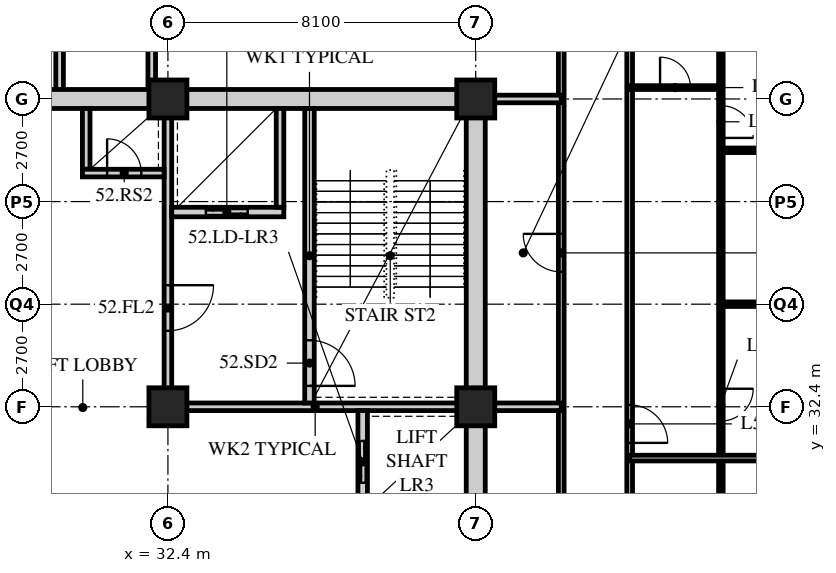
"""IFC4 building model, lengths in metres.
Left out: names, types, materials, properties, quantities, classifications, styles, units other than length and angle.
Written with IfcOpenShell. Run it as: python <this file> out.ifc"""

import sys

from ifc_helpers import new_model, si_unit, direction, frame, frame_2d, origin, origin_2d, place, context, subcontext, project, spatial, rectangle, hollow_rectangle, extrude, element, fill, save


model = new_model("IFC4")
c1 = context("Model", 3, precision=1e-05, world=origin(), true_north=direction((0.0, 1.0)))
c2 = subcontext(c1, "Body", "Model", "MODEL_VIEW")
j1 = project(units=[si_unit("LENGTHUNIT", "METRE"), si_unit("PLANEANGLEUNIT", "RADIAN")], contexts=[c1])
p1 = place(None, origin())
s1 = spatial("IfcSite", under=j1, at=p1, CompositionType="ELEMENT")
p2 = place(p1, origin())
s2 = spatial("IfcBuilding", under=s1, at=p2, CompositionType="ELEMENT")
p3 = place(p2, frame((0.0, 0.0, 202.8)))
s3 = spatial("IfcBuildingStorey", under=s2, at=p3, CompositionType="ELEMENT", Elevation=202.8)
for number, where, z_axis, x_axis in (
    (1, (32.4, 32.4, 0.0), (0.0, 0.0, 1.0), (1.0, 0.0, 0.0)),
    (2, (32.4, 40.5, 0.0), (0.0, 0.0, 1.0), (1.0, 0.0, 0.0)),
    (3, (40.5, 32.4, 0.0), (0.0, 0.0, 1.0), (1.0, 0.0, 0.0)),
    (4, (40.5, 40.5, 0.0), (0.0, 0.0, 1.0), (1.0, 0.0, 0.0)),
):
    element("IfcColumn", number, at=place(p3, frame(where, z_axis=z_axis, x_axis=x_axis)), inside=s3, PredefinedType="COLUMN", context=c2, shape_type="SweptSolid", body=[
        extrude(hollow_rectangle(XDim=1.0, YDim=1.0, WallThickness=0.1, at=origin_2d()), origin(), (0.0, 0.0, 1.0), 3.6),
    ])
p4 = place(p3, frame((44.55, 18.9, 0.0), z_axis=(0.0, 0.0, 1.0), x_axis=(0.0, 1.0, 0.0)))
e5 = element("IfcWall", 5, at=p4, inside=s3, PredefinedType="PARTITIONING", context=c2, shape_type="SweptSolid", body=[
    extrude(rectangle(XDim=28.35, YDim=0.15, at=frame_2d((14.175, 0.0))), origin(), (0.0, 0.0, 1.0), 3.39),
])
p5 = place(p4, frame((0.4, 0.0, 0.0)))
e6 = element("IfcOpeningElement", 6, at=p5, cuts=e5, PredefinedType="OPENING", context=c2, shape_type="SweptSolid", body=[
    extrude(rectangle(XDim=1.0, YDim=2.1, at=frame_2d((0.5, 1.05))), frame((0.0, 0.085, 0.0), z_axis=(0.0, -1.0, 0.0), x_axis=(1.0, 0.0, 0.0)), (0.0, 0.0, 1.0), 0.17),
])
p6 = place(p4, frame((12.55, 0.0, 0.0)))
e7 = element("IfcOpeningElement", 7, at=p6, cuts=e5, PredefinedType="OPENING", context=c2, shape_type="SweptSolid", body=[
    extrude(rectangle(XDim=1.0, YDim=2.1, at=frame_2d((0.5, 1.05))), frame((0.0, 0.085, 0.0), z_axis=(0.0, -1.0, 0.0), x_axis=(1.0, 0.0, 0.0)), (0.0, 0.0, 1.0), 0.17),
])
p7 = place(p4, frame((26.65, 0.0, 0.0)))
e8 = element("IfcOpeningElement", 8, at=p7, cuts=e5, PredefinedType="OPENING", context=c2, shape_type="SweptSolid", body=[
    extrude(rectangle(XDim=1.0, YDim=2.1, at=frame_2d((0.5, 1.05))), frame((0.0, 0.085, 0.0), z_axis=(0.0, -1.0, 0.0), x_axis=(1.0, 0.0, 0.0)), (0.0, 0.0, 1.0), 0.17),
])
p8 = place(p3, frame((42.75, 20.7, 0.0), z_axis=(0.0, 0.0, 1.0), x_axis=(0.0, 1.0, 0.0)))
e9 = element("IfcWall", 9, at=p8, inside=s3, PredefinedType="PARTITIONING", context=c2, shape_type="SweptSolid", body=[
    extrude(rectangle(XDim=24.75, YDim=0.15, at=frame_2d((12.375, 0.0))), origin(), (0.0, 0.0, 1.0), 3.39),
])
p9 = place(p8, frame((7.15, 0.0, 0.0)))
e10 = element("IfcOpeningElement", 10, at=p9, cuts=e9, PredefinedType="OPENING", context=c2, shape_type="SweptSolid", body=[
    extrude(rectangle(XDim=1.0, YDim=2.1, at=frame_2d((0.5, 1.05))), frame((0.0, 0.085, 0.0), z_axis=(0.0, -1.0, 0.0), x_axis=(1.0, 0.0, 0.0)), (0.0, 0.0, 1.0), 0.17),
])
p10 = place(p8, frame((15.25, 0.0, 0.0)))
e11 = element("IfcOpeningElement", 11, at=p10, cuts=e9, PredefinedType="OPENING", context=c2, shape_type="SweptSolid", body=[
    extrude(rectangle(XDim=1.0, YDim=2.1, at=frame_2d((0.5, 1.05))), frame((0.0, 0.085, 0.0), z_axis=(0.0, -1.0, 0.0), x_axis=(1.0, 0.0, 0.0)), (0.0, 0.0, 1.0), 0.17),
])
p11 = place(p3, frame((40.5, 32.4, 0.0), z_axis=(0.0, 0.0, 1.0), x_axis=(1.0, 0.0, 0.0)))
e12 = element("IfcWall", 12, at=p11, inside=s3, PredefinedType="SOLIDWALL", context=c2, shape_type="SweptSolid", body=[
    extrude(rectangle(XDim=2.25, YDim=0.2, at=frame_2d((1.125, 0.0))), origin(), (0.0, 0.0, 1.0), 3.39),
])
p12 = place(p3, frame((31.974, 45.45, 0.0), z_axis=(0.0, 0.0, 1.0), x_axis=(0.0, -1.0, 0.0)))
e13 = element("IfcWall", 13, at=p12, inside=s3, PredefinedType="SOLIDWALL", context=c2, shape_type="SweptSolid", body=[
    extrude(rectangle(XDim=4.95, YDim=0.2, at=frame_2d((2.475, 0.0))), origin(), (0.0, 0.0, 1.0), 2.69),
])
p13 = place(p3, frame((29.55, 40.5, 0.0), z_axis=(0.0, 0.0, 1.0), x_axis=(0.0, 1.0, 0.0)))
e14 = element("IfcWall", 14, at=p13, inside=s3, PredefinedType="SOLIDWALL", context=c2, shape_type="SweptSolid", body=[
    extrude(rectangle(XDim=4.95, YDim=0.2, at=frame_2d((2.475, 0.0))), origin(), (0.0, 0.0, 1.0), 3.39),
])
p14 = place(p3, frame((40.5, 40.5, 0.0), z_axis=(0.0, 0.0, 1.0), x_axis=(1.0, 0.0, 0.0)))
e15 = element("IfcWall", 15, at=p14, inside=s3, PredefinedType="SOLIDWALL", context=c2, shape_type="SweptSolid", body=[
    extrude(rectangle(XDim=2.25, YDim=0.2, at=frame_2d((1.125, 0.0))), origin(), (0.0, 0.0, 1.0), 3.39),
])
p15 = place(p3, frame((46.95, 18.9, 0.0), z_axis=(0.0, 0.0, 1.0), x_axis=(0.0, 1.0, 0.0)))
e16 = element("IfcWall", 16, at=p15, inside=s3, PredefinedType="PARTITIONING", context=c2, shape_type="SweptSolid", body=[
    extrude(rectangle(XDim=24.3, YDim=0.12, at=frame_2d((12.15, 0.0))), origin(), (0.0, 0.0, 1.0), 3.39),
])
p16 = place(p15, frame((0.975, 0.0, 0.0)))
e17 = element("IfcOpeningElement", 17, at=p16, cuts=e16, PredefinedType="OPENING", context=c2, shape_type="SweptSolid", body=[
    extrude(rectangle(XDim=0.85, YDim=2.1, at=frame_2d((0.425, 1.05))), frame((0.0, 0.07, 0.0), z_axis=(0.0, -1.0, 0.0), x_axis=(1.0, 0.0, 0.0)), (0.0, 0.0, 1.0), 0.14),
])
p17 = place(p15, frame((8.425, 0.0, 0.0)))
e18 = element("IfcOpeningElement", 18, at=p17, cuts=e16, PredefinedType="OPENING", context=c2, shape_type="SweptSolid", body=[
    extrude(rectangle(XDim=0.85, YDim=2.1, at=frame_2d((0.425, 1.05))), frame((0.0, 0.07, 0.0), z_axis=(0.0, -1.0, 0.0), x_axis=(1.0, 0.0, 0.0)), (0.0, 0.0, 1.0), 0.14),
])
p18 = place(p15, frame((13.125, 0.0, 0.0)))
e19 = element("IfcOpeningElement", 19, at=p18, cuts=e16, PredefinedType="OPENING", context=c2, shape_type="SweptSolid", body=[
    extrude(rectangle(XDim=0.85, YDim=2.1, at=frame_2d((0.425, 1.05))), frame((0.0, 0.07, 0.0), z_axis=(0.0, -1.0, 0.0), x_axis=(1.0, 0.0, 0.0)), (0.0, 0.0, 1.0), 0.14),
])
p19 = place(p15, frame((20.575, 0.0, 0.0)))
e20 = element("IfcOpeningElement", 20, at=p19, cuts=e16, PredefinedType="OPENING", context=c2, shape_type="SweptSolid", body=[
    extrude(rectangle(XDim=0.85, YDim=2.1, at=frame_2d((0.425, 1.05))), frame((0.0, 0.07, 0.0), z_axis=(0.0, -1.0, 0.0), x_axis=(1.0, 0.0, 0.0)), (0.0, 0.0, 1.0), 0.14),
])
p20 = place(p3, frame((44.55, 31.05, 0.0), z_axis=(0.0, 0.0, 1.0), x_axis=(1.0, 0.0, 0.0)))
e21 = element("IfcWall", 21, at=p20, inside=s3, PredefinedType="PARTITIONING", context=c2, shape_type="SweptSolid", body=[
    extrude(rectangle(XDim=11.85, YDim=0.15, at=frame_2d((5.925, 0.0))), origin(), (0.0, 0.0, 1.0), 3.39),
])
p21 = place(p3, frame((44.55, 40.8, 0.0), z_axis=(0.0, 0.0, 1.0), x_axis=(1.0, 0.0, 0.0)))
e22 = element("IfcWall", 22, at=p21, inside=s3, PredefinedType="PARTITIONING", context=c2, shape_type="SweptSolid", body=[
    extrude(rectangle(XDim=2.4, YDim=0.1, at=frame_2d((1.2, 0.0))), origin(), (0.0, 0.0, 1.0), 3.39),
])
p22 = place(p21, frame((0.8, 0.0, 0.0)))
e23 = element("IfcOpeningElement", 23, at=p22, cuts=e22, PredefinedType="OPENING", context=c2, shape_type="SweptSolid", body=[
    extrude(rectangle(XDim=0.8, YDim=2.1, at=frame_2d((0.4, 1.05))), frame((0.0, 0.06, 0.0), z_axis=(0.0, -1.0, 0.0), x_axis=(1.0, 0.0, 0.0)), (0.0, 0.0, 1.0), 0.12),
])
p23 = place(p3, frame((46.95, 39.15, 0.0), z_axis=(0.0, 0.0, 1.0), x_axis=(1.0, 0.0, 0.0)))
e24 = element("IfcWall", 24, at=p23, inside=s3, PredefinedType="PARTITIONING", context=c2, shape_type="SweptSolid", body=[
    extrude(rectangle(XDim=9.45, YDim=0.12, at=frame_2d((4.725, 0.0))), origin(), (0.0, 0.0, 1.0), 3.39),
])
p24 = place(p3, frame((46.95, 35.1, 0.0), z_axis=(0.0, 0.0, 1.0), x_axis=(1.0, 0.0, 0.0)))
e25 = element("IfcWall", 25, at=p24, inside=s3, PredefinedType="PARTITIONING", context=c2, shape_type="SweptSolid", body=[
    extrude(rectangle(XDim=1.35, YDim=0.12, at=frame_2d((0.675, 0.0))), origin(), (0.0, 0.0, 1.0), 2.778),
])
p25 = place(p3, frame((15.95, 40.5, 0.0), z_axis=(0.0, 0.0, 1.0), x_axis=(1.0, 0.0, 0.0)))
e26 = element("IfcWall", 26, at=p25, inside=s3, PredefinedType="SOLIDWALL", context=c2, shape_type="SweptSolid", body=[
    extrude(rectangle(XDim=24.8, YDim=0.5, at=frame_2d((12.4, 0.0))), origin(), (0.0, 0.0, 1.0), 2.74),
])
p26 = place(p25, frame((11.5, 0.0, 0.0)))
e27 = element("IfcOpeningElement", 27, at=p26, cuts=e26, PredefinedType="OPENING", context=c2, shape_type="SweptSolid", body=[
    extrude(rectangle(XDim=1.8, YDim=2.4, at=frame_2d((0.9, 1.2))), frame((0.0, 0.26, 0.0), z_axis=(0.0, -1.0, 0.0), x_axis=(1.0, 0.0, 0.0)), (0.0, 0.0, 1.0), 0.52),
])
p27 = place(p3, frame((40.5, 24.55, 0.0), z_axis=(0.0, 0.0, 1.0), x_axis=(0.0, 1.0, 0.0)))
e28 = element("IfcWall", 28, at=p27, inside=s3, PredefinedType="SOLIDWALL", context=c2, shape_type="SweptSolid", body=[
    extrude(rectangle(XDim=15.7, YDim=0.5, at=frame_2d((7.85, 0.0))), origin(), (0.0, 0.0, 1.0), 2.778),
])
p28 = place(p3, frame((32.3, 32.4, 0.0), z_axis=(0.0, 0.0, 1.0), x_axis=(1.0, 0.0, 0.0)))
e29 = element("IfcWall", 29, at=p28, inside=s3, PredefinedType="SOLIDWALL", context=c2, shape_type="SweptSolid", body=[
    extrude(rectangle(XDim=7.95, YDim=0.2, at=frame_2d((3.975, 0.0))), origin(), (0.0, 0.0, 1.0), 2.778),
])
p29 = place(p3, frame((32.4, 32.5, 0.0), z_axis=(0.0, 0.0, 1.0), x_axis=(0.0, 1.0, 0.0)))
e30 = element("IfcWall", 30, at=p29, inside=s3, PredefinedType="SOLIDWALL", context=c2, shape_type="SweptSolid", body=[
    extrude(rectangle(XDim=7.75, YDim=0.2, at=frame_2d((3.875, 0.0))), origin(), (0.0, 0.0, 1.0), 2.778),
])
p30 = place(p29, frame((1.9, 0.0, 0.0)))
e31 = element("IfcOpeningElement", 31, at=p30, cuts=e30, PredefinedType="OPENING", context=c2, shape_type="SweptSolid", body=[
    extrude(rectangle(XDim=1.2, YDim=2.1, at=frame_2d((0.6, 1.05))), frame((0.0, 0.11, 0.0), z_axis=(0.0, -1.0, 0.0), x_axis=(1.0, 0.0, 0.0)), (0.0, 0.0, 1.0), 0.22),
])
p31 = place(p3, frame((37.525, 24.55, 0.0), z_axis=(0.0, 0.0, 1.0), x_axis=(0.0, 1.0, 0.0)))
e32 = element("IfcWall", 32, at=p31, inside=s3, PredefinedType="SOLIDWALL", context=c2, shape_type="SweptSolid", body=[
    extrude(rectangle(XDim=7.75, YDim=0.25, at=frame_2d((3.875, 0.0))), origin(), (0.0, 0.0, 1.0), 3.39),
])
p32 = place(p31, frame((0.65, 0.0, 0.0)))
e33 = element("IfcOpeningElement", 33, at=p32, cuts=e32, PredefinedType="OPENING", context=c2, shape_type="SweptSolid", body=[
    extrude(rectangle(XDim=1.1, YDim=2.4, at=frame_2d((0.55, 1.2))), frame((0.0, 0.135, 0.0), z_axis=(0.0, -1.0, 0.0), x_axis=(1.0, 0.0, 0.0)), (0.0, 0.0, 1.0), 0.27),
])
p33 = place(p31, frame((3.25, 0.0, 0.0)))
e34 = element("IfcOpeningElement", 34, at=p33, cuts=e32, PredefinedType="OPENING", context=c2, shape_type="SweptSolid", body=[
    extrude(rectangle(XDim=1.1, YDim=2.4, at=frame_2d((0.55, 1.2))), frame((0.0, 0.135, 0.0), z_axis=(0.0, -1.0, 0.0), x_axis=(1.0, 0.0, 0.0)), (0.0, 0.0, 1.0), 0.27),
])
p34 = place(p31, frame((5.85, 0.0, 0.0)))
e35 = element("IfcOpeningElement", 35, at=p34, cuts=e32, PredefinedType="OPENING", context=c2, shape_type="SweptSolid", body=[
    extrude(rectangle(XDim=1.1, YDim=2.4, at=frame_2d((0.55, 1.2))), frame((0.0, 0.135, 0.0), z_axis=(0.0, -1.0, 0.0), x_axis=(1.0, 0.0, 0.0)), (0.0, 0.0, 1.0), 0.27),
])
p35 = place(p3, frame((36.125, 32.5, 0.0), z_axis=(0.0, 0.0, 1.0), x_axis=(0.0, 1.0, 0.0)))
e36 = element("IfcWall", 36, at=p35, inside=s3, PredefinedType="SOLIDWALL", context=c2, shape_type="SweptSolid", body=[
    extrude(rectangle(XDim=7.75, YDim=0.25, at=frame_2d((3.875, 0.0))), origin(), (0.0, 0.0, 1.0), 3.39),
])
p36 = place(p35, frame((0.45, 0.0, 0.0)))
e37 = element("IfcOpeningElement", 37, at=p36, cuts=e36, PredefinedType="OPENING", context=c2, shape_type="SweptSolid", body=[
    extrude(rectangle(XDim=1.2, YDim=2.1, at=frame_2d((0.6, 1.05))), frame((0.0, 0.135, 0.0), z_axis=(0.0, -1.0, 0.0), x_axis=(1.0, 0.0, 0.0)), (0.0, 0.0, 1.0), 0.27),
])
p37 = place(p3, frame((32.5, 37.525, 0.0), z_axis=(0.0, 0.0, 1.0), x_axis=(1.0, 0.0, 0.0)))
e38 = element("IfcWall", 38, at=p37, inside=s3, PredefinedType="SOLIDWALL", context=c2, shape_type="SweptSolid", body=[
    extrude(rectangle(XDim=2.95, YDim=0.25, at=frame_2d((1.475, 0.0))), origin(), (0.0, 0.0, 1.0), 3.39),
])
p38 = place(p37, frame((0.9, 0.0, 0.0)))
e39 = element("IfcOpeningElement", 39, at=p38, cuts=e38, PredefinedType="OPENING", context=c2, shape_type="SweptSolid", body=[
    extrude(rectangle(XDim=1.1, YDim=2.4, at=frame_2d((0.55, 1.2))), frame((0.0, 0.135, 0.0), z_axis=(0.0, -1.0, 0.0), x_axis=(1.0, 0.0, 0.0)), (0.0, 0.0, 1.0), 0.27),
])
p39 = place(p3, frame((35.35, 37.65, 0.0), z_axis=(0.0, 0.0, 1.0), x_axis=(0.0, 1.0, 0.0)))
e40 = element("IfcWall", 40, at=p39, inside=s3, PredefinedType="SOLIDWALL", context=c2, shape_type="SweptSolid", body=[
    extrude(rectangle(XDim=2.6, YDim=0.2, at=frame_2d((1.3, 0.0))), origin(), (0.0, 0.0, 1.0), 3.39),
])
p40 = place(p3, frame((30.25, 38.65, 0.0), z_axis=(0.0, 0.0, 1.0), x_axis=(0.0, 1.0, 0.0)))
e41 = element("IfcWall", 41, at=p40, inside=s3, PredefinedType="SOLIDWALL", context=c2, shape_type="SweptSolid", body=[
    extrude(rectangle(XDim=1.6, YDim=0.2, at=frame_2d((0.8, 0.0))), origin(), (0.0, 0.0, 1.0), 3.39),
])
p41 = place(p3, frame((30.15, 38.55, 0.0), z_axis=(0.0, 0.0, 1.0), x_axis=(1.0, 0.0, 0.0)))
e42 = element("IfcWall", 42, at=p41, inside=s3, PredefinedType="SOLIDWALL", context=c2, shape_type="SweptSolid", body=[
    extrude(rectangle(XDim=2.15, YDim=0.2, at=frame_2d((1.075, 0.0))), origin(), (0.0, 0.0, 1.0), 3.39),
])
p42 = place(p41, frame((0.65, 0.0, 0.0)))
e43 = element("IfcOpeningElement", 43, at=p42, cuts=e42, PredefinedType="OPENING", context=c2, shape_type="SweptSolid", body=[
    extrude(rectangle(XDim=0.9, YDim=2.1, at=frame_2d((0.45, 1.05))), frame((0.0, 0.11, 0.0), z_axis=(0.0, -1.0, 0.0), x_axis=(1.0, 0.0, 0.0)), (0.0, 0.0, 1.0), 0.22),
])
p43 = place(p10, origin())
e44 = element("IfcDoor", 44, at=p43, inside=s3, OperationType="SINGLE_SWING_RIGHT", PredefinedType="DOOR", context=c2, shape_type="SweptSolid", body=[
    extrude(rectangle(XDim=1.0, YDim=2.1, at=frame_2d((0.5, 1.05))), frame((0.0, 0.025, 0.0), z_axis=(0.0, -1.0, 0.0), x_axis=(1.0, 0.0, 0.0)), (0.0, 0.0, 1.0), 0.05),
])
fill(e11, e44)
p44 = place(p22, origin())
e45 = element("IfcDoor", 45, at=p44, inside=s3, OperationType="SINGLE_SWING_LEFT", PredefinedType="DOOR", context=c2, shape_type="SweptSolid", body=[
    extrude(rectangle(XDim=0.8, YDim=2.1, at=frame_2d((0.4, 1.05))), frame((0.0, 0.025, 0.0), z_axis=(0.0, -1.0, 0.0), x_axis=(1.0, 0.0, 0.0)), (0.0, 0.0, 1.0), 0.05),
])
fill(e23, e45)
p45 = place(p6, origin())
e46 = element("IfcDoor", 46, at=p45, inside=s3, OperationType="SINGLE_SWING_RIGHT", PredefinedType="DOOR", context=c2, shape_type="SweptSolid", body=[
    extrude(rectangle(XDim=1.0, YDim=2.1, at=frame_2d((0.5, 1.05))), frame((0.0, 0.025, 0.0), z_axis=(0.0, -1.0, 0.0), x_axis=(1.0, 0.0, 0.0)), (0.0, 0.0, 1.0), 0.05),
])
fill(e7, e46)
p46 = place(p18, origin())
e47 = element("IfcDoor", 47, at=p46, inside=s3, OperationType="SINGLE_SWING_LEFT", PredefinedType="DOOR", context=c2, shape_type="SweptSolid", body=[
    extrude(rectangle(XDim=0.85, YDim=2.1, at=frame_2d((0.425, 1.05))), frame((0.0, 0.025, 0.0), z_axis=(0.0, -1.0, 0.0), x_axis=(1.0, 0.0, 0.0)), (0.0, 0.0, 1.0), 0.05),
])
fill(e19, e47)
p47 = place(p19, origin())
e48 = element("IfcDoor", 48, at=p47, inside=s3, OperationType="SINGLE_SWING_RIGHT", PredefinedType="DOOR", context=c2, shape_type="SweptSolid", body=[
    extrude(rectangle(XDim=0.85, YDim=2.1, at=frame_2d((0.425, 1.05))), frame((0.0, 0.025, 0.0), z_axis=(0.0, -1.0, 0.0), x_axis=(1.0, 0.0, 0.0)), (0.0, 0.0, 1.0), 0.05),
])
fill(e20, e48)
p48 = place(p36, origin())
e49 = element("IfcDoor", 49, at=p48, inside=s3, OperationType="SINGLE_SWING_RIGHT", PredefinedType="DOOR", context=c2, shape_type="SweptSolid", body=[
    extrude(rectangle(XDim=1.2, YDim=2.1, at=frame_2d((0.6, 1.05))), frame((0.0, 0.025, 0.0), z_axis=(0.0, -1.0, 0.0), x_axis=(1.0, 0.0, 0.0)), (0.0, 0.0, 1.0), 0.05),
])
fill(e37, e49)
p49 = place(p30, origin())
e50 = element("IfcDoor", 50, at=p49, inside=s3, OperationType="SINGLE_SWING_LEFT", PredefinedType="DOOR", context=c2, shape_type="SweptSolid", body=[
    extrude(rectangle(XDim=1.2, YDim=2.1, at=frame_2d((0.6, 1.05))), frame((0.0, 0.025, 0.0), z_axis=(0.0, -1.0, 0.0), x_axis=(1.0, 0.0, 0.0)), (0.0, 0.0, 1.0), 0.05),
])
fill(e31, e50)
p50 = place(p42, origin())
e51 = element("IfcDoor", 51, at=p50, inside=s3, OperationType="SINGLE_SWING_LEFT", PredefinedType="DOOR", context=c2, shape_type="SweptSolid", body=[
    extrude(rectangle(XDim=0.9, YDim=2.1, at=frame_2d((0.45, 1.05))), frame((0.0, 0.025, 0.0), z_axis=(0.0, -1.0, 0.0), x_axis=(1.0, 0.0, 0.0)), (0.0, 0.0, 1.0), 0.05),
])
fill(e43, e51)
p51 = place(p34, origin())
e52 = element("IfcDoor", 52, at=p51, inside=s3, OperationType="DOUBLE_DOOR_SLIDING", PredefinedType="DOOR", context=c2, shape_type="SweptSolid", body=[
    extrude(rectangle(XDim=1.1, YDim=2.4, at=frame_2d((0.55, 1.2))), frame((0.0, 0.025, 0.0), z_axis=(0.0, -1.0, 0.0), x_axis=(1.0, 0.0, 0.0)), (0.0, 0.0, 1.0), 0.05),
])
fill(e35, e52)
p52 = place(p38, origin())
e53 = element("IfcDoor", 53, at=p52, inside=s3, OperationType="DOUBLE_DOOR_SLIDING", PredefinedType="DOOR", context=c2, shape_type="SweptSolid", body=[
    extrude(rectangle(XDim=1.1, YDim=2.4, at=frame_2d((0.55, 1.2))), frame((0.0, 0.025, 0.0), z_axis=(0.0, -1.0, 0.0), x_axis=(1.0, 0.0, 0.0)), (0.0, 0.0, 1.0), 0.05),
])
fill(e39, e53)
save(model, sys.argv[1])
